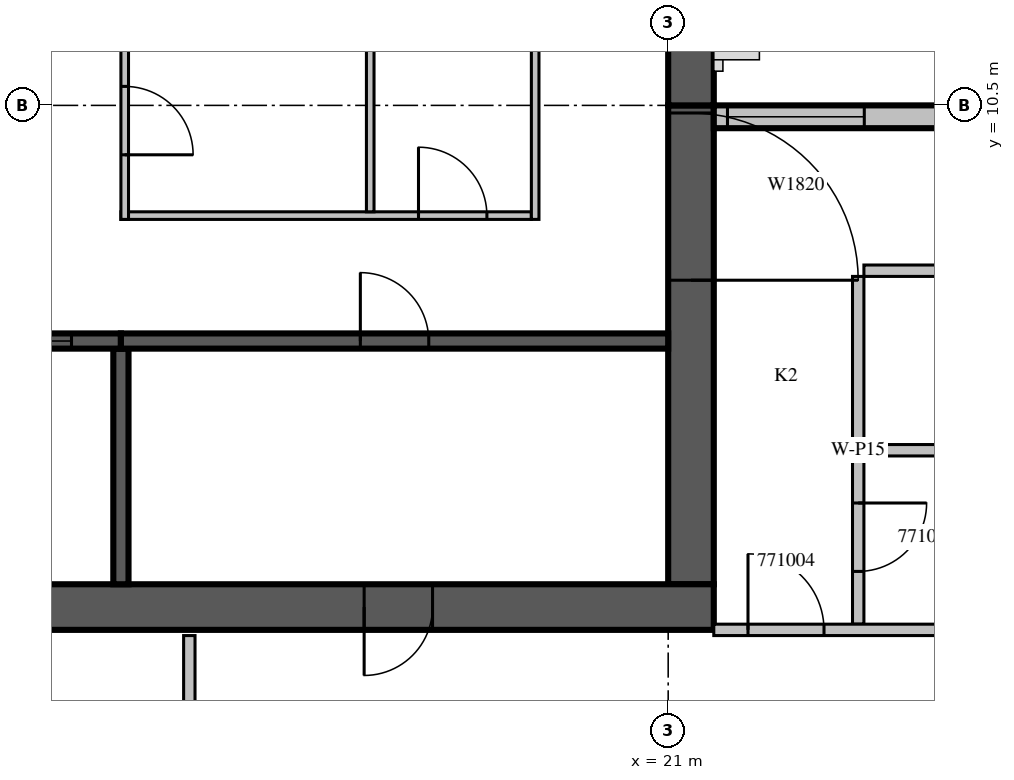
"""IFC4 building model, lengths in metres.
Left out: names, types, materials, properties, quantities, classifications, styles, units other than length and angle.
Written with IfcOpenShell. Run it as: python <this file> out.ifc"""

import sys

from ifc_helpers import new_model, si_unit, direction, frame, frame_2d, origin, place, context, subcontext, project, spatial, rectangle, extrude, source, transform, mapped, element, fill, save


model = new_model("IFC4")
c1 = context("Model", 3, precision=1e-05, world=origin(), true_north=direction((0.0, 1.0)))
c2 = subcontext(c1, "Body", "Model", "MODEL_VIEW")
j1 = project(units=[si_unit("LENGTHUNIT", "METRE"), si_unit("PLANEANGLEUNIT", "RADIAN")], contexts=[c1])
p1 = place(None, origin())
s1 = spatial("IfcSite", under=j1, at=p1, CompositionType="ELEMENT")
p2 = place(p1, origin())
s2 = spatial("IfcBuilding", under=s1, at=p2, CompositionType="ELEMENT")
p3 = place(p2, frame((0.0, 0.0, 309.0)))
s3 = spatial("IfcBuildingStorey", under=s2, at=p3, CompositionType="ELEMENT", Elevation=309.0)
m1 = source(origin(), c2, "Body", "SweptSolid", [
    extrude(rectangle(XDim=6.3, YDim=0.6, at=frame_2d((3.15, 0.0))), origin(), (0.0, 0.0, 1.0), 3.5),
])
p4 = place(p3, frame((21.3, 4.2, 0.0), z_axis=(0.0, 0.0, 1.0), x_axis=(0.0, 1.0, 0.0)))
e1 = element("IfcWall", 1, at=p4, inside=s3, PredefinedType="SHEAR", context=c2, shape_type="MappedRepresentation", body=[
    mapped(m1, transform((0.0, 0.0, 0.0), scale=1.0)),
])
m2 = source(origin(), c2, "Body", "SweptSolid", [
    extrude(rectangle(XDim=2.2, YDim=2.1, at=frame_2d((1.1, 1.05))), frame((0.0, 0.31, 0.0), z_axis=(0.0, -1.0, 0.0), x_axis=(1.0, 0.0, 0.0)), (0.0, 0.0, 1.0), 0.62),
])
p5 = place(p4, frame((4.0, 0.0, 0.0)))
e2 = element("IfcOpeningElement", 2, at=p5, cuts=e1, PredefinedType="OPENING", context=c2, shape_type="MappedRepresentation", body=[
    mapped(m2, transform((0.0, 0.0, 0.0), scale=1.0)),
])
m3 = source(origin(), c2, "Body", "SweptSolid", [
    extrude(rectangle(XDim=17.4, YDim=0.6, at=frame_2d((8.7, 0.0))), origin(), (0.0, 0.0, 1.0), 3.5),
])
p6 = place(p3, frame((4.2, 3.9, 0.0), z_axis=(0.0, 0.0, 1.0), x_axis=(1.0, 0.0, 0.0)))
e3 = element("IfcWall", 3, at=p6, inside=s3, PredefinedType="SHEAR", context=c2, shape_type="MappedRepresentation", body=[
    mapped(m3, transform((0.0, 0.0, 0.0), scale=1.0)),
])
m4 = source(origin(), c2, "Body", "SweptSolid", [
    extrude(rectangle(XDim=0.9, YDim=2.1, at=frame_2d((0.45, 1.05))), frame((0.0, 0.31, 0.0), z_axis=(0.0, -1.0, 0.0), x_axis=(1.0, 0.0, 0.0)), (0.0, 0.0, 1.0), 0.62),
])
p7 = place(p6, frame((12.8, 0.0, 0.0)))
e4 = element("IfcOpeningElement", 4, at=p7, cuts=e3, PredefinedType="OPENING", context=c2, shape_type="MappedRepresentation", body=[
    mapped(m4, transform((0.0, 0.0, 0.0), scale=1.0)),
])
m5 = source(origin(), c2, "Body", "SweptSolid", [
    extrude(rectangle(XDim=10.5, YDim=0.6, at=frame_2d((5.25, 0.0))), origin(), (0.0, 0.0, 1.0), 3.5),
])
p8 = place(p3, frame((21.3, 10.5, 0.0), z_axis=(0.0, 0.0, 1.0), x_axis=(0.0, 1.0, 0.0)))
e5 = element("IfcWall", 5, at=p8, inside=s3, PredefinedType="SHEAR", context=c2, shape_type="MappedRepresentation", body=[
    mapped(m5, transform((0.0, 0.0, 0.0), scale=1.0)),
])
m6 = source(origin(), c2, "Body", "SweptSolid", [
    extrude(rectangle(XDim=1.2, YDim=2.4, at=frame_2d((0.6, 1.2))), frame((0.0, 0.31, 0.0), z_axis=(0.0, -1.0, 0.0), x_axis=(1.0, 0.0, 0.0)), (0.0, 0.0, 1.0), 0.62),
])
p9 = place(p8, frame((5.7, 0.0, 0.6)))
e6 = element("IfcOpeningElement", 6, at=p9, cuts=e5, PredefinedType="OPENING", context=c2, shape_type="MappedRepresentation", body=[
    mapped(m6, transform((0.0, 0.0, 0.0), scale=1.0)),
])
m7 = source(origin(), c2, "Body", "SweptSolid", [
    extrude(rectangle(XDim=7.45, YDim=0.3, at=frame_2d((3.725, 0.0))), origin(), (0.0, 0.0, 1.0), 3.1),
])
p10 = place(p3, frame((29.05, 10.35, 0.0), z_axis=(0.0, 0.0, 1.0), x_axis=(-1.0, 0.0, 0.0)))
e7 = element("IfcWall", 7, at=p10, inside=s3, PredefinedType="STANDARD", context=c2, shape_type="MappedRepresentation", body=[
    mapped(m7, transform((0.0, 0.0, 0.0), scale=1.0)),
])
m8 = source(origin(), c2, "Body", "SweptSolid", [
    extrude(rectangle(XDim=3.0, YDim=2.0, at=frame_2d((1.5, 1.0))), frame((0.0, 0.16, 0.0), z_axis=(0.0, -1.0, 0.0), x_axis=(1.0, 0.0, 0.0)), (0.0, 0.0, 1.0), 0.32),
])
p11 = place(p10, frame((1.09, 0.0, 0.6)))
e8 = element("IfcOpeningElement", 8, at=p11, cuts=e7, PredefinedType="OPENING", context=c2, shape_type="MappedRepresentation", body=[
    mapped(m8, transform((0.0, 0.0, 0.0), scale=1.0)),
])
m9 = source(origin(), c2, "Body", "SweptSolid", [
    extrude(rectangle(XDim=1.8, YDim=2.0, at=frame_2d((0.9, 1.0))), frame((0.0, 0.16, 0.0), z_axis=(0.0, -1.0, 0.0), x_axis=(1.0, 0.0, 0.0)), (0.0, 0.0, 1.0), 0.32),
])
p12 = place(p10, frame((5.47, 0.0, 0.6)))
e9 = element("IfcOpeningElement", 9, at=p12, cuts=e7, PredefinedType="OPENING", context=c2, shape_type="MappedRepresentation", body=[
    mapped(m9, transform((0.0, 0.0, 0.0), scale=1.0)),
])
m10 = source(origin(), c2, "Body", "SweptSolid", [
    extrude(rectangle(XDim=3.1, YDim=0.2, at=frame_2d((1.55, 0.0))), origin(), (0.0, 0.0, 1.0), 3.1),
])
p13 = place(p3, frame((13.8, 4.2, 0.0), z_axis=(0.0, 0.0, 1.0), x_axis=(0.0, 1.0, 0.0)))
e10 = element("IfcWall", 10, at=p13, inside=s3, PredefinedType="SOLIDWALL", context=c2, shape_type="MappedRepresentation", body=[
    mapped(m10, transform((0.0, 0.0, 0.0), scale=1.0)),
])
m11 = source(origin(), c2, "Body", "SweptSolid", [
    extrude(rectangle(XDim=9.6, YDim=0.2, at=frame_2d((4.8, 0.0))), origin(), (0.0, 0.0, 1.0), 3.5),
])
p14 = place(p3, frame((4.2, 7.4, 0.0), z_axis=(0.0, 0.0, 1.0), x_axis=(1.0, 0.0, 0.0)))
e11 = element("IfcWall", 11, at=p14, inside=s3, PredefinedType="SOLIDWALL", context=c2, shape_type="MappedRepresentation", body=[
    mapped(m11, transform((0.0, 0.0, 0.0), scale=1.0)),
])
m12 = source(origin(), c2, "Body", "SweptSolid", [
    extrude(rectangle(XDim=1.1, YDim=2.1, at=frame_2d((0.55, 1.05))), frame((0.0, 0.11, 0.0), z_axis=(0.0, -1.0, 0.0), x_axis=(1.0, 0.0, 0.0)), (0.0, 0.0, 1.0), 0.22),
])
p15 = place(p14, frame((0.65, 0.0, 0.0)))
e12 = element("IfcOpeningElement", 12, at=p15, cuts=e11, PredefinedType="OPENING", context=c2, shape_type="MappedRepresentation", body=[
    mapped(m12, transform((0.0, 0.0, 0.0), scale=1.0)),
])
p16 = place(p14, frame((3.05, 0.0, 0.0)))
e13 = element("IfcOpeningElement", 13, at=p16, cuts=e11, PredefinedType="OPENING", context=c2, shape_type="MappedRepresentation", body=[
    mapped(m12, transform((0.0, 0.0, 0.0), scale=1.0)),
])
p17 = place(p14, frame((5.45, 0.0, 0.0)))
e14 = element("IfcOpeningElement", 14, at=p17, cuts=e11, PredefinedType="OPENING", context=c2, shape_type="MappedRepresentation", body=[
    mapped(m12, transform((0.0, 0.0, 0.0), scale=1.0)),
])
p18 = place(p14, frame((7.85, 0.0, 0.0)))
e15 = element("IfcOpeningElement", 15, at=p18, cuts=e11, PredefinedType="OPENING", context=c2, shape_type="MappedRepresentation", body=[
    mapped(m12, transform((0.0, 0.0, 0.0), scale=1.0)),
])
m13 = source(origin(), c2, "Body", "SweptSolid", [
    extrude(rectangle(XDim=7.2, YDim=0.2, at=frame_2d((3.6, 0.0))), origin(), (0.0, 0.0, 1.0), 3.1),
])
p19 = place(p3, frame((13.8, 7.4, 0.0), z_axis=(0.0, 0.0, 1.0), x_axis=(1.0, 0.0, 0.0)))
e16 = element("IfcWall", 16, at=p19, inside=s3, PredefinedType="SOLIDWALL", context=c2, shape_type="MappedRepresentation", body=[
    mapped(m13, transform((0.0, 0.0, 0.0), scale=1.0)),
])
m14 = source(origin(), c2, "Body", "SweptSolid", [
    extrude(rectangle(XDim=0.9, YDim=2.1, at=frame_2d((0.45, 1.05))), frame((0.0, 0.11, 0.0), z_axis=(0.0, -1.0, 0.0), x_axis=(1.0, 0.0, 0.0)), (0.0, 0.0, 1.0), 0.22),
])
p20 = place(p19, frame((3.15, 0.0, 0.0)))
e17 = element("IfcOpeningElement", 17, at=p20, cuts=e16, PredefinedType="OPENING", context=c2, shape_type="MappedRepresentation", body=[
    mapped(m14, transform((0.0, 0.0, 0.0), scale=1.0)),
])
m15 = source(origin(), c2, "Body", "SweptSolid", [
    extrude(rectangle(XDim=5.4, YDim=0.1, at=frame_2d((2.7, 0.0))), origin(), (0.0, 0.0, 1.0), 3.1),
])
p21 = place(p3, frame((13.8, 9.05, 0.0), z_axis=(0.0, 0.0, 1.0), x_axis=(1.0, 0.0, 0.0)))
e18 = element("IfcWall", 18, at=p21, inside=s3, PredefinedType="PARTITIONING", context=c2, shape_type="MappedRepresentation", body=[
    mapped(m15, transform((0.0, 0.0, 0.0), scale=1.0)),
])
m16 = source(origin(), c2, "Body", "SweptSolid", [
    extrude(rectangle(XDim=0.9, YDim=2.1, at=frame_2d((0.45, 1.05))), frame((0.0, 0.06, 0.0), z_axis=(0.0, -1.0, 0.0), x_axis=(1.0, 0.0, 0.0)), (0.0, 0.0, 1.0), 0.12),
])
p22 = place(p21, frame((3.915, 0.0, 0.0)))
e19 = element("IfcOpeningElement", 19, at=p22, cuts=e18, PredefinedType="OPENING", context=c2, shape_type="MappedRepresentation", body=[
    mapped(m16, transform((0.0, 0.0, 0.0), scale=1.0)),
])
m17 = source(origin(), c2, "Body", "SweptSolid", [
    extrude(rectangle(XDim=2.5, YDim=0.1, at=frame_2d((1.25, 0.0))), origin(), (0.0, 0.0, 1.0), 3.1),
])
p23 = place(p3, frame((13.85, 9.0, 0.0), z_axis=(0.0, 0.0, 1.0), x_axis=(0.0, 1.0, 0.0)))
e20 = element("IfcWall", 20, at=p23, inside=s3, PredefinedType="PARTITIONING", context=c2, shape_type="MappedRepresentation", body=[
    mapped(m17, transform((0.0, 0.0, 0.0), scale=1.0)),
])
p24 = place(p23, frame((0.85, 0.0, 0.0)))
e21 = element("IfcOpeningElement", 21, at=p24, cuts=e20, PredefinedType="OPENING", context=c2, shape_type="MappedRepresentation", body=[
    mapped(m16, transform((0.0, 0.0, 0.0), scale=1.0)),
])
m18 = source(origin(), c2, "Body", "SweptSolid", [
    extrude(rectangle(XDim=2.4, YDim=0.1, at=frame_2d((1.2, 0.0))), origin(), (0.0, 0.0, 1.0), 3.1),
])
p25 = place(p3, frame((17.08, 9.1, 0.0), z_axis=(0.0, 0.0, 1.0), x_axis=(0.0, 1.0, 0.0)))
e22 = element("IfcWall", 22, at=p25, inside=s3, PredefinedType="PARTITIONING", context=c2, shape_type="MappedRepresentation", body=[
    mapped(m18, transform((0.0, 0.0, 0.0), scale=1.0)),
])
p26 = place(p3, frame((19.25, 9.0, 0.0), z_axis=(0.0, 0.0, 1.0), x_axis=(0.0, 1.0, 0.0)))
e23 = element("IfcWall", 23, at=p26, inside=s3, PredefinedType="PARTITIONING", context=c2, shape_type="MappedRepresentation", body=[
    mapped(m17, transform((0.0, 0.0, 0.0), scale=1.0)),
])
m19 = source(origin(), c2, "Body", "SweptSolid", [
    extrude(rectangle(XDim=4.575, YDim=0.15, at=frame_2d((2.288, 0.0))), origin(), (0.0, 0.0, 1.0), 3.1),
])
p27 = place(p3, frame((23.5, 8.25, 0.0), z_axis=(0.0, 0.0, 1.0), x_axis=(0.0, -1.0, 0.0)))
e24 = element("IfcWall", 24, at=p27, inside=s3, PredefinedType="PARTITIONING", context=c2, shape_type="MappedRepresentation", body=[
    mapped(m19, transform((0.0, 0.0, 0.0), scale=1.0)),
])
m20 = source(origin(), c2, "Body", "SweptSolid", [
    extrude(rectangle(XDim=0.9, YDim=2.1, at=frame_2d((0.45, 1.05))), frame((0.0, 0.085, 0.0), z_axis=(0.0, -1.0, 0.0), x_axis=(1.0, 0.0, 0.0)), (0.0, 0.0, 1.0), 0.17),
])
p28 = place(p27, frame((2.981, 0.0, 0.0)))
e25 = element("IfcOpeningElement", 25, at=p28, cuts=e24, PredefinedType="OPENING", context=c2, shape_type="MappedRepresentation", body=[
    mapped(m20, transform((0.0, 0.0, 0.0), scale=1.0)),
])
m21 = source(origin(), c2, "Body", "SweptSolid", [
    extrude(rectangle(XDim=5.75, YDim=0.15, at=frame_2d((2.875, 0.0))), origin(), (0.0, 0.0, 1.0), 3.1),
])
p29 = place(p3, frame((29.325, 8.325, 0.0), z_axis=(0.0, 0.0, 1.0), x_axis=(-1.0, 0.0, 0.0)))
e26 = element("IfcWall", 26, at=p29, inside=s3, PredefinedType="PARTITIONING", context=c2, shape_type="MappedRepresentation", body=[
    mapped(m21, transform((0.0, 0.0, 0.0), scale=1.0)),
])
m22 = source(origin(), c2, "Body", "SweptSolid", [
    extrude(rectangle(XDim=1.0, YDim=2.1, at=frame_2d((0.5, 1.05))), frame((0.0, 0.085, 0.0), z_axis=(0.0, -1.0, 0.0), x_axis=(1.0, 0.0, 0.0)), (0.0, 0.0, 1.0), 0.17),
])
p30 = place(p29, frame((2.375, 0.0, 0.0)))
e27 = element("IfcOpeningElement", 27, at=p30, cuts=e26, PredefinedType="OPENING", context=c2, shape_type="MappedRepresentation", body=[
    mapped(m22, transform((0.0, 0.0, 0.0), scale=1.0)),
])
p31 = place(p3, frame((29.325, 5.963, 0.0), z_axis=(0.0, 0.0, 1.0), x_axis=(-1.0, 0.0, 0.0)))
e28 = element("IfcWall", 28, at=p31, inside=s3, PredefinedType="PARTITIONING", context=c2, shape_type="MappedRepresentation", body=[
    mapped(m21, transform((0.0, 0.0, 0.0), scale=1.0)),
])
m23 = source(origin(), c2, "Body", "SweptSolid", [
    extrude(rectangle(XDim=3.225, YDim=0.15, at=frame_2d((1.613, 0.0))), origin(), (0.0, 0.0, 1.0), 3.1),
])
p32 = place(p3, frame((14.7, 3.525, 0.0), z_axis=(0.0, 0.0, 1.0), x_axis=(0.0, -1.0, 0.0)))
e29 = element("IfcWall", 29, at=p32, inside=s3, PredefinedType="PARTITIONING", context=c2, shape_type="MappedRepresentation", body=[
    mapped(m23, transform((0.0, 0.0, 0.0), scale=1.0)),
])
p33 = place(p32, frame((1.125, 0.0, 0.0)))
e30 = element("IfcOpeningElement", 30, at=p33, cuts=e29, PredefinedType="OPENING", context=c2, shape_type="MappedRepresentation", body=[
    mapped(m20, transform((0.0, 0.0, 0.0), scale=1.0)),
])
m24 = source(origin(), c2, "Body", "SweptSolid", [
    extrude(rectangle(XDim=7.725, YDim=0.15, at=frame_2d((3.862, 0.0))), origin(), (0.0, 0.0, 1.0), 3.1),
])
p34 = place(p3, frame((21.6, 3.6, 0.0), z_axis=(0.0, 0.0, 1.0), x_axis=(1.0, 0.0, 0.0)))
e31 = element("IfcWall", 31, at=p34, inside=s3, PredefinedType="PARTITIONING", context=c2, shape_type="MappedRepresentation", body=[
    mapped(m24, transform((0.0, 0.0, 0.0), scale=1.0)),
])
p35 = place(p34, frame((0.45, 0.0, 0.0)))
e32 = element("IfcOpeningElement", 32, at=p35, cuts=e31, PredefinedType="OPENING", context=c2, shape_type="MappedRepresentation", body=[
    mapped(m22, transform((0.0, 0.0, 0.0), scale=1.0)),
])
m25 = source(origin(), c2, "Body", "SweptSolid", [
    extrude(rectangle(XDim=1.8, YDim=2.0, at=frame_2d((0.9, 1.0))), frame((0.0, 0.03, 0.0), z_axis=(0.0, -1.0, 0.0), x_axis=(1.0, 0.0, 0.0)), (0.0, 0.0, 1.0), 0.06),
])
p36 = place(p12, origin())
e33 = element("IfcWindow", 33, at=p36, inside=s3, PartitioningType="SINGLE_PANEL", PredefinedType="WINDOW", context=c2, shape_type="MappedRepresentation", body=[
    mapped(m25, transform((0.0, 0.0, 0.0), scale=1.0)),
])
fill(e9, e33)
m26 = source(origin(), c2, "Body", "SweptSolid", [
    extrude(rectangle(XDim=1.1, YDim=2.1, at=frame_2d((0.55, 1.05))), frame((0.0, 0.025, 0.0), z_axis=(0.0, -1.0, 0.0), x_axis=(1.0, 0.0, 0.0)), (0.0, 0.0, 1.0), 0.05),
])
p37 = place(p18, origin())
e34 = element("IfcDoor", 34, at=p37, inside=s3, OperationType="SLIDING_TO_LEFT", PredefinedType="DOOR", context=c2, shape_type="MappedRepresentation", body=[
    mapped(m26, transform((0.0, 0.0, 0.0), scale=1.0)),
])
fill(e15, e34)
m27 = source(origin(), c2, "Body", "SweptSolid", [
    extrude(rectangle(XDim=0.9, YDim=2.1, at=frame_2d((0.45, 1.05))), frame((0.0, 0.025, 0.0), z_axis=(0.0, -1.0, 0.0), x_axis=(1.0, 0.0, 0.0)), (0.0, 0.0, 1.0), 0.05),
])
p38 = place(p20, origin())
e35 = element("IfcDoor", 35, at=p38, inside=s3, OperationType="SINGLE_SWING_LEFT", PredefinedType="DOOR", context=c2, shape_type="MappedRepresentation", body=[
    mapped(m27, transform((0.0, 0.0, 0.0), scale=1.0)),
])
fill(e17, e35)
p39 = place(p22, origin())
e36 = element("IfcDoor", 36, at=p39, inside=s3, OperationType="SINGLE_SWING_LEFT", PredefinedType="DOOR", context=c2, shape_type="MappedRepresentation", body=[
    mapped(m27, transform((0.0, 0.0, 0.0), scale=1.0)),
])
fill(e19, e36)
p40 = place(p24, origin())
e37 = element("IfcDoor", 37, at=p40, inside=s3, OperationType="SINGLE_SWING_RIGHT", PredefinedType="DOOR", context=c2, shape_type="MappedRepresentation", body=[
    mapped(m27, transform((0.0, 0.0, 0.0), scale=1.0)),
])
fill(e21, e37)
m28 = source(origin(), c2, "Body", "SweptSolid", [
    extrude(rectangle(XDim=2.2, YDim=2.1, at=frame_2d((1.1, 1.05))), frame((0.0, 0.025, 0.0), z_axis=(0.0, -1.0, 0.0), x_axis=(1.0, 0.0, 0.0)), (0.0, 0.0, 1.0), 0.05),
])
p41 = place(p5, origin())
e38 = element("IfcDoor", 38, at=p41, inside=s3, OperationType="DOUBLE_DOOR_SINGLE_SWING", PredefinedType="DOOR", context=c2, shape_type="MappedRepresentation", body=[
    mapped(m28, transform((0.0, 0.0, 0.0), scale=1.0)),
])
fill(e2, e38)
p42 = place(p7, origin())
e39 = element("IfcDoor", 39, at=p42, inside=s3, OperationType="SINGLE_SWING_RIGHT", PredefinedType="DOOR", context=c2, shape_type="MappedRepresentation", body=[
    mapped(m27, transform((0.0, 0.0, 0.0), scale=1.0)),
])
fill(e4, e39)
p43 = place(p28, origin())
e40 = element("IfcDoor", 40, at=p43, inside=s3, OperationType="SINGLE_SWING_LEFT", PredefinedType="DOOR", context=c2, shape_type="MappedRepresentation", body=[
    mapped(m27, transform((0.0, 0.0, 0.0), scale=1.0)),
])
fill(e25, e40)
m29 = source(origin(), c2, "Body", "SweptSolid", [
    extrude(rectangle(XDim=1.0, YDim=2.1, at=frame_2d((0.5, 1.05))), frame((0.0, 0.025, 0.0), z_axis=(0.0, -1.0, 0.0), x_axis=(1.0, 0.0, 0.0)), (0.0, 0.0, 1.0), 0.05),
])
p44 = place(p35, origin())
e41 = element("IfcDoor", 41, at=p44, inside=s3, OperationType="SINGLE_SWING_LEFT", PredefinedType="DOOR", context=c2, shape_type="MappedRepresentation", body=[
    mapped(m29, transform((0.0, 0.0, 0.0), scale=1.0)),
])
fill(e32, e41)
save(model, sys.argv[1])
